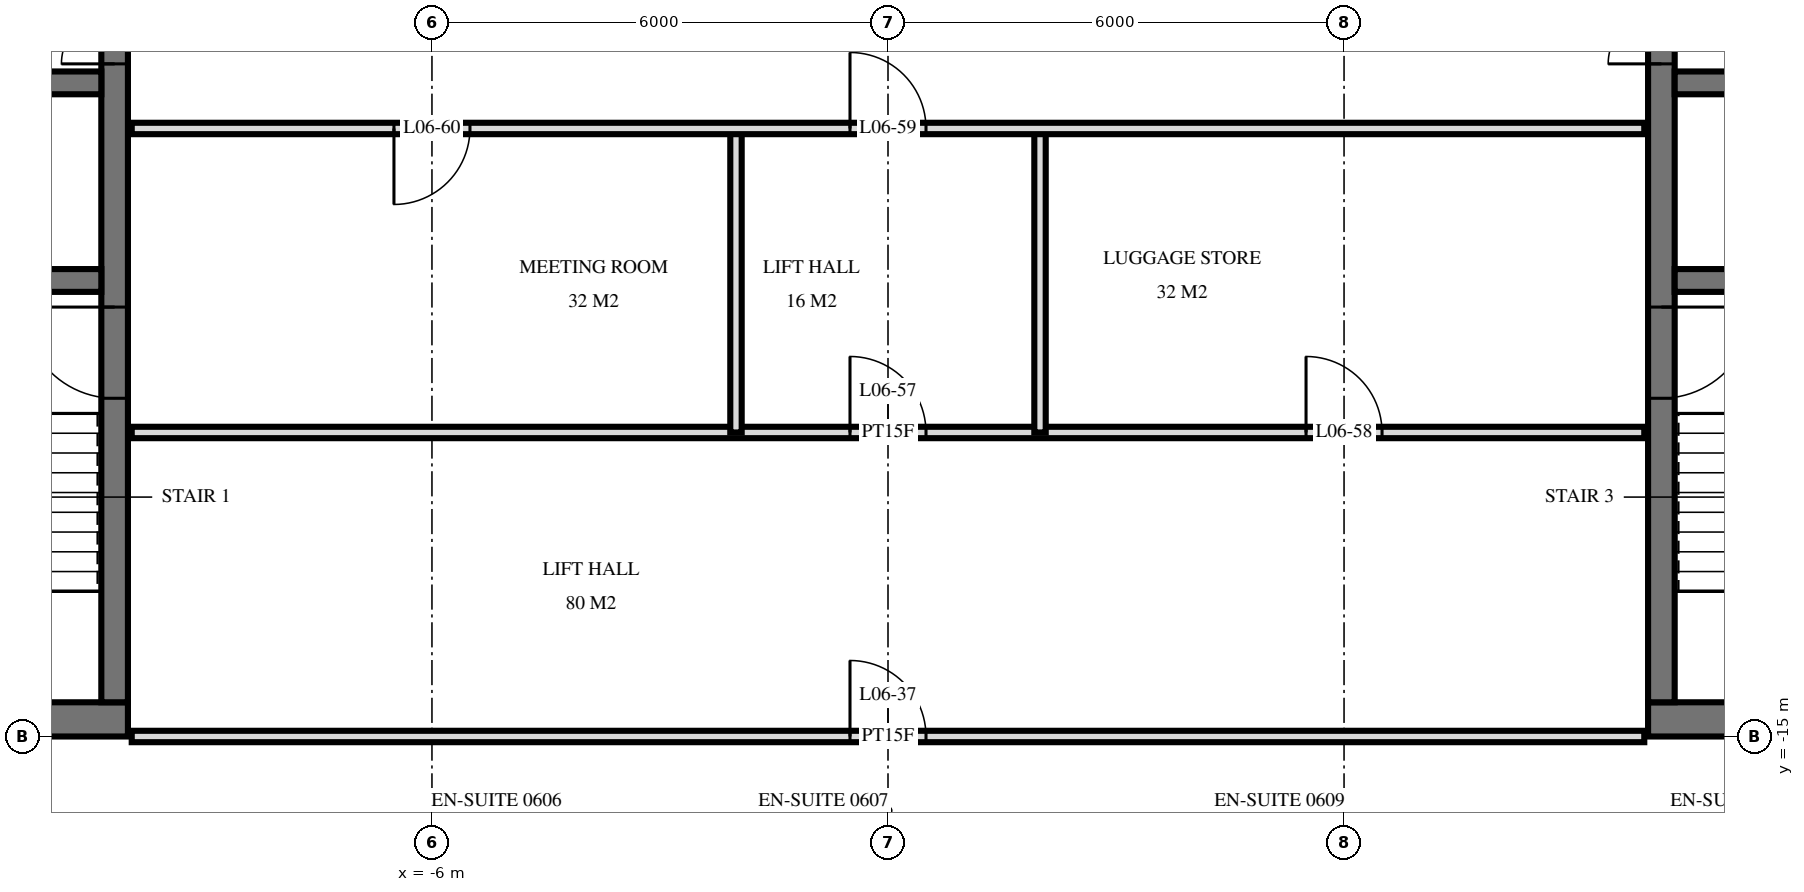
"""IFC4 building model, lengths in metres.
Left out: names, types, materials, properties, quantities, classifications, styles, units other than length and angle.
Written with IfcOpenShell. Run it as: python <this file> out.ifc"""

import sys

from ifc_helpers import new_model, si_unit, direction, frame, frame_2d, origin, place, context, subcontext, project, spatial, rectangle, extrude, element, fill, save


model = new_model("IFC4")
c1 = context("Model", 3, precision=1e-05, world=origin(), true_north=direction((0.0, 1.0)))
c2 = subcontext(c1, "Body", "Model", "MODEL_VIEW")
j1 = project(units=[si_unit("LENGTHUNIT", "METRE"), si_unit("PLANEANGLEUNIT", "RADIAN")], contexts=[c1])
p1 = place(None, origin())
s1 = spatial("IfcSite", under=j1, at=p1, CompositionType="ELEMENT")
p2 = place(p1, origin())
s2 = spatial("IfcBuilding", under=s1, at=p2, CompositionType="ELEMENT")
p3 = place(p2, frame((0.0, 0.0, 31.2)))
s3 = spatial("IfcBuildingStorey", under=s2, at=p3, CompositionType="ELEMENT", Elevation=31.2)
p4 = place(p3, frame((-29.5, -14.775, 0.0), z_axis=(0.0, 0.0, 1.0), x_axis=(1.0, 0.0, 0.0)))
e1 = element("IfcWall", 1, at=p4, inside=s3, PredefinedType="SHEAR", context=c2, shape_type="SweptSolid", body=[
    extrude(rectangle(XDim=19.5, YDim=0.45, at=frame_2d((9.75, 0.0))), origin(), (0.0, 0.0, 1.0), 3.6),
])
p5 = place(p4, frame((11.2, 0.0, 0.0)))
e2 = element("IfcOpeningElement", 2, at=p5, cuts=e1, PredefinedType="OPENING", context=c2, shape_type="SweptSolid", body=[
    extrude(rectangle(XDim=1.2, YDim=2.1, at=frame_2d((0.6, 1.05))), frame((0.0, 0.235, 0.0), z_axis=(0.0, -1.0, 0.0), x_axis=(1.0, 0.0, 0.0)), (0.0, 0.0, 1.0), 0.47),
])
p6 = place(p4, frame((14.25, 0.0, 0.0)))
e3 = element("IfcOpeningElement", 3, at=p6, cuts=e1, PredefinedType="OPENING", context=c2, shape_type="SweptSolid", body=[
    extrude(rectangle(XDim=1.1, YDim=2.1, at=frame_2d((0.55, 1.05))), frame((0.0, 0.235, 0.0), z_axis=(0.0, -1.0, 0.0), x_axis=(1.0, 0.0, 0.0)), (0.0, 0.0, 1.0), 0.47),
])
p7 = place(p4, frame((8.5, 0.0, 0.0)))
e4 = element("IfcOpeningElement", 4, at=p7, cuts=e1, PredefinedType="OPENING", context=c2, shape_type="SweptSolid", body=[
    extrude(rectangle(XDim=0.9, YDim=2.1, at=frame_2d((0.45, 1.05))), frame((0.0, 0.235, 0.0), z_axis=(0.0, -1.0, 0.0), x_axis=(1.0, 0.0, 0.0)), (0.0, 0.0, 1.0), 0.47),
])
p8 = place(p4, frame((6.05, 0.0, 0.0)))
e5 = element("IfcOpeningElement", 5, at=p8, cuts=e1, PredefinedType="OPENING", context=c2, shape_type="SweptSolid", body=[
    extrude(rectangle(XDim=1.0, YDim=2.1, at=frame_2d((0.5, 1.05))), frame((0.0, 0.235, 0.0), z_axis=(0.0, -1.0, 0.0), x_axis=(1.0, 0.0, 0.0)), (0.0, 0.0, 1.0), 0.47),
])
p9 = place(p4, frame((2.988, 0.0, 0.0)))
e6 = element("IfcOpeningElement", 6, at=p9, cuts=e1, PredefinedType="OPENING", context=c2, shape_type="SweptSolid", body=[
    extrude(rectangle(XDim=1.0, YDim=2.1, at=frame_2d((0.5, 1.05))), frame((0.0, 0.235, 0.0), z_axis=(0.0, -1.0, 0.0), x_axis=(1.0, 0.0, 0.0)), (0.0, 0.0, 1.0), 0.47),
])
p10 = place(p4, frame((0.663, 0.0, 0.0)))
e7 = element("IfcOpeningElement", 7, at=p10, cuts=e1, PredefinedType="OPENING", context=c2, shape_type="SweptSolid", body=[
    extrude(rectangle(XDim=1.0, YDim=2.1, at=frame_2d((0.5, 1.05))), frame((0.0, 0.235, 0.0), z_axis=(0.0, -1.0, 0.0), x_axis=(1.0, 0.0, 0.0)), (0.0, 0.0, 1.0), 0.47),
])
p11 = place(p3, frame((-10.175, -14.55, 0.0), z_axis=(0.0, 0.0, 1.0), x_axis=(0.0, 1.0, 0.0)))
e8 = element("IfcWall", 8, at=p11, inside=s3, PredefinedType="SHEAR", context=c2, shape_type="SweptSolid", body=[
    extrude(rectangle(XDim=14.1, YDim=0.35, at=frame_2d((7.05, 0.0))), origin(), (0.0, 0.0, 1.0), 3.6),
])
p12 = place(p11, frame((8.4, 0.0, 0.0)))
e9 = element("IfcOpeningElement", 9, at=p12, cuts=e8, PredefinedType="OPENING", context=c2, shape_type="SweptSolid", body=[
    extrude(rectangle(XDim=1.4, YDim=2.4, at=frame_2d((0.7, 1.2))), frame((0.0, 0.185, 0.0), z_axis=(0.0, -1.0, 0.0), x_axis=(1.0, 0.0, 0.0)), (0.0, 0.0, 1.0), 0.37),
])
p13 = place(p11, frame((10.0, 0.0, 0.0)))
e10 = element("IfcOpeningElement", 10, at=p13, cuts=e8, PredefinedType="OPENING", context=c2, shape_type="SweptSolid", body=[
    extrude(rectangle(XDim=1.4, YDim=2.4, at=frame_2d((0.7, 1.2))), frame((0.0, 0.185, 0.0), z_axis=(0.0, -1.0, 0.0), x_axis=(1.0, 0.0, 0.0)), (0.0, 0.0, 1.0), 0.37),
])
p14 = place(p11, frame((4.0, 0.0, 0.0)))
e11 = element("IfcOpeningElement", 11, at=p14, cuts=e8, PredefinedType="OPENING", context=c2, shape_type="SweptSolid", body=[
    extrude(rectangle(XDim=1.2, YDim=2.1, at=frame_2d((0.6, 1.05))), frame((0.0, 0.185, 0.0), z_axis=(0.0, -1.0, 0.0), x_axis=(1.0, 0.0, 0.0)), (0.0, 0.0, 1.0), 0.37),
])
p15 = place(p3, frame((-29.05, -6.4, 0.0), z_axis=(0.0, 0.0, 1.0), x_axis=(1.0, 0.0, 0.0)))
e12 = element("IfcWall", 12, at=p15, inside=s3, PredefinedType="SHEAR", context=c2, shape_type="SweptSolid", body=[
    extrude(rectangle(XDim=18.7, YDim=0.3, at=frame_2d((9.35, 0.0))), origin(), (0.0, 0.0, 1.0), 3.6),
])
p16 = place(p15, frame((2.95, 0.0, 0.0)))
e13 = element("IfcOpeningElement", 13, at=p16, cuts=e12, PredefinedType="OPENING", context=c2, shape_type="SweptSolid", body=[
    extrude(rectangle(XDim=1.1, YDim=2.1, at=frame_2d((0.55, 1.05))), frame((0.0, 0.16, 0.0), z_axis=(0.0, -1.0, 0.0), x_axis=(1.0, 0.0, 0.0)), (0.0, 0.0, 1.0), 0.32),
])
p17 = place(p15, frame((0.55, 0.0, 0.0)))
e14 = element("IfcOpeningElement", 14, at=p17, cuts=e12, PredefinedType="OPENING", context=c2, shape_type="SweptSolid", body=[
    extrude(rectangle(XDim=1.1, YDim=2.1, at=frame_2d((0.55, 1.05))), frame((0.0, 0.16, 0.0), z_axis=(0.0, -1.0, 0.0), x_axis=(1.0, 0.0, 0.0)), (0.0, 0.0, 1.0), 0.32),
])
p18 = place(p15, frame((10.8, 0.0, 0.0)))
e15 = element("IfcOpeningElement", 15, at=p18, cuts=e12, PredefinedType="OPENING", context=c2, shape_type="SweptSolid", body=[
    extrude(rectangle(XDim=1.1, YDim=2.1, at=frame_2d((0.55, 1.05))), frame((0.0, 0.16, 0.0), z_axis=(0.0, -1.0, 0.0), x_axis=(1.0, 0.0, 0.0)), (0.0, 0.0, 1.0), 0.32),
])
p19 = place(p15, frame((5.6, 0.0, 0.0)))
e16 = element("IfcOpeningElement", 16, at=p19, cuts=e12, PredefinedType="OPENING", context=c2, shape_type="SweptSolid", body=[
    extrude(rectangle(XDim=1.0, YDim=2.1, at=frame_2d((0.5, 1.05))), frame((0.0, 0.16, 0.0), z_axis=(0.0, -1.0, 0.0), x_axis=(1.0, 0.0, 0.0)), (0.0, 0.0, 1.0), 0.32),
])
p20 = place(p3, frame((-29.05, -9.0, 0.0), z_axis=(0.0, 0.0, 1.0), x_axis=(1.0, 0.0, 0.0)))
e17 = element("IfcWall", 17, at=p20, inside=s3, PredefinedType="SHEAR", context=c2, shape_type="SweptSolid", body=[
    extrude(rectangle(XDim=18.7, YDim=0.3, at=frame_2d((9.35, 0.0))), origin(), (0.0, 0.0, 1.0), 3.6),
])
p21 = place(p20, frame((13.8, 0.0, 0.0)))
e18 = element("IfcOpeningElement", 18, at=p21, cuts=e17, PredefinedType="OPENING", context=c2, shape_type="SweptSolid", body=[
    extrude(rectangle(XDim=1.1, YDim=2.1, at=frame_2d((0.55, 1.05))), frame((0.0, 0.16, 0.0), z_axis=(0.0, -1.0, 0.0), x_axis=(1.0, 0.0, 0.0)), (0.0, 0.0, 1.0), 0.32),
])
p22 = place(p3, frame((10.0, -14.775, 0.0), z_axis=(0.0, 0.0, 1.0), x_axis=(1.0, 0.0, 0.0)))
e19 = element("IfcWall", 19, at=p22, inside=s3, PredefinedType="SHEAR", context=c2, shape_type="SweptSolid", body=[
    extrude(rectangle(XDim=19.5, YDim=0.45, at=frame_2d((9.75, 0.0))), origin(), (0.0, 0.0, 1.0), 3.6),
])
p23 = place(p22, frame((7.1, 0.0, 0.0)))
e20 = element("IfcOpeningElement", 20, at=p23, cuts=e19, PredefinedType="OPENING", context=c2, shape_type="SweptSolid", body=[
    extrude(rectangle(XDim=1.2, YDim=2.1, at=frame_2d((0.6, 1.05))), frame((0.0, 0.235, 0.0), z_axis=(0.0, -1.0, 0.0), x_axis=(1.0, 0.0, 0.0)), (0.0, 0.0, 1.0), 0.47),
])
p24 = place(p22, frame((4.15, 0.0, 0.0)))
e21 = element("IfcOpeningElement", 21, at=p24, cuts=e19, PredefinedType="OPENING", context=c2, shape_type="SweptSolid", body=[
    extrude(rectangle(XDim=1.1, YDim=2.1, at=frame_2d((0.55, 1.05))), frame((0.0, 0.235, 0.0), z_axis=(0.0, -1.0, 0.0), x_axis=(1.0, 0.0, 0.0)), (0.0, 0.0, 1.0), 0.47),
])
p25 = place(p22, frame((10.1, 0.0, 0.0)))
e22 = element("IfcOpeningElement", 22, at=p25, cuts=e19, PredefinedType="OPENING", context=c2, shape_type="SweptSolid", body=[
    extrude(rectangle(XDim=0.9, YDim=2.1, at=frame_2d((0.45, 1.05))), frame((0.0, 0.235, 0.0), z_axis=(0.0, -1.0, 0.0), x_axis=(1.0, 0.0, 0.0)), (0.0, 0.0, 1.0), 0.47),
])
p26 = place(p22, frame((12.45, 0.0, 0.0)))
e23 = element("IfcOpeningElement", 23, at=p26, cuts=e19, PredefinedType="OPENING", context=c2, shape_type="SweptSolid", body=[
    extrude(rectangle(XDim=1.0, YDim=2.1, at=frame_2d((0.5, 1.05))), frame((0.0, 0.235, 0.0), z_axis=(0.0, -1.0, 0.0), x_axis=(1.0, 0.0, 0.0)), (0.0, 0.0, 1.0), 0.47),
])
p27 = place(p22, frame((15.512, 0.0, 0.0)))
e24 = element("IfcOpeningElement", 24, at=p27, cuts=e19, PredefinedType="OPENING", context=c2, shape_type="SweptSolid", body=[
    extrude(rectangle(XDim=1.0, YDim=2.1, at=frame_2d((0.5, 1.05))), frame((0.0, 0.235, 0.0), z_axis=(0.0, -1.0, 0.0), x_axis=(1.0, 0.0, 0.0)), (0.0, 0.0, 1.0), 0.47),
])
p28 = place(p22, frame((17.837, 0.0, 0.0)))
e25 = element("IfcOpeningElement", 25, at=p28, cuts=e19, PredefinedType="OPENING", context=c2, shape_type="SweptSolid", body=[
    extrude(rectangle(XDim=1.0, YDim=2.1, at=frame_2d((0.5, 1.05))), frame((0.0, 0.235, 0.0), z_axis=(0.0, -1.0, 0.0), x_axis=(1.0, 0.0, 0.0)), (0.0, 0.0, 1.0), 0.47),
])
p29 = place(p3, frame((10.175, -14.55, 0.0), z_axis=(0.0, 0.0, 1.0), x_axis=(0.0, 1.0, 0.0)))
e26 = element("IfcWall", 26, at=p29, inside=s3, PredefinedType="SHEAR", context=c2, shape_type="SweptSolid", body=[
    extrude(rectangle(XDim=14.1, YDim=0.35, at=frame_2d((7.05, 0.0))), origin(), (0.0, 0.0, 1.0), 3.6),
])
p30 = place(p29, frame((8.4, 0.0, 0.0)))
e27 = element("IfcOpeningElement", 27, at=p30, cuts=e26, PredefinedType="OPENING", context=c2, shape_type="SweptSolid", body=[
    extrude(rectangle(XDim=1.4, YDim=2.4, at=frame_2d((0.7, 1.2))), frame((0.0, 0.185, 0.0), z_axis=(0.0, -1.0, 0.0), x_axis=(1.0, 0.0, 0.0)), (0.0, 0.0, 1.0), 0.37),
])
p31 = place(p29, frame((10.0, 0.0, 0.0)))
e28 = element("IfcOpeningElement", 28, at=p31, cuts=e26, PredefinedType="OPENING", context=c2, shape_type="SweptSolid", body=[
    extrude(rectangle(XDim=1.4, YDim=2.4, at=frame_2d((0.7, 1.2))), frame((0.0, 0.185, 0.0), z_axis=(0.0, -1.0, 0.0), x_axis=(1.0, 0.0, 0.0)), (0.0, 0.0, 1.0), 0.37),
])
p32 = place(p29, frame((4.0, 0.0, 0.0)))
e29 = element("IfcOpeningElement", 29, at=p32, cuts=e26, PredefinedType="OPENING", context=c2, shape_type="SweptSolid", body=[
    extrude(rectangle(XDim=1.2, YDim=2.1, at=frame_2d((0.6, 1.05))), frame((0.0, 0.185, 0.0), z_axis=(0.0, -1.0, 0.0), x_axis=(1.0, 0.0, 0.0)), (0.0, 0.0, 1.0), 0.37),
])
p33 = place(p3, frame((10.35, -6.4, 0.0), z_axis=(0.0, 0.0, 1.0), x_axis=(1.0, 0.0, 0.0)))
e30 = element("IfcWall", 30, at=p33, inside=s3, PredefinedType="SHEAR", context=c2, shape_type="SweptSolid", body=[
    extrude(rectangle(XDim=18.7, YDim=0.3, at=frame_2d((9.35, 0.0))), origin(), (0.0, 0.0, 1.0), 3.6),
])
p34 = place(p33, frame((14.65, 0.0, 0.0)))
e31 = element("IfcOpeningElement", 31, at=p34, cuts=e30, PredefinedType="OPENING", context=c2, shape_type="SweptSolid", body=[
    extrude(rectangle(XDim=1.1, YDim=2.1, at=frame_2d((0.55, 1.05))), frame((0.0, 0.16, 0.0), z_axis=(0.0, -1.0, 0.0), x_axis=(1.0, 0.0, 0.0)), (0.0, 0.0, 1.0), 0.32),
])
p35 = place(p33, frame((17.05, 0.0, 0.0)))
e32 = element("IfcOpeningElement", 32, at=p35, cuts=e30, PredefinedType="OPENING", context=c2, shape_type="SweptSolid", body=[
    extrude(rectangle(XDim=1.1, YDim=2.1, at=frame_2d((0.55, 1.05))), frame((0.0, 0.16, 0.0), z_axis=(0.0, -1.0, 0.0), x_axis=(1.0, 0.0, 0.0)), (0.0, 0.0, 1.0), 0.32),
])
p36 = place(p33, frame((6.8, 0.0, 0.0)))
e33 = element("IfcOpeningElement", 33, at=p36, cuts=e30, PredefinedType="OPENING", context=c2, shape_type="SweptSolid", body=[
    extrude(rectangle(XDim=1.1, YDim=2.1, at=frame_2d((0.55, 1.05))), frame((0.0, 0.16, 0.0), z_axis=(0.0, -1.0, 0.0), x_axis=(1.0, 0.0, 0.0)), (0.0, 0.0, 1.0), 0.32),
])
p37 = place(p33, frame((12.1, 0.0, 0.0)))
e34 = element("IfcOpeningElement", 34, at=p37, cuts=e30, PredefinedType="OPENING", context=c2, shape_type="SweptSolid", body=[
    extrude(rectangle(XDim=1.0, YDim=2.1, at=frame_2d((0.5, 1.05))), frame((0.0, 0.16, 0.0), z_axis=(0.0, -1.0, 0.0), x_axis=(1.0, 0.0, 0.0)), (0.0, 0.0, 1.0), 0.32),
])
p38 = place(p3, frame((10.35, -9.0, 0.0), z_axis=(0.0, 0.0, 1.0), x_axis=(1.0, 0.0, 0.0)))
e35 = element("IfcWall", 35, at=p38, inside=s3, PredefinedType="SHEAR", context=c2, shape_type="SweptSolid", body=[
    extrude(rectangle(XDim=18.7, YDim=0.3, at=frame_2d((9.35, 0.0))), origin(), (0.0, 0.0, 1.0), 3.6),
])
p39 = place(p38, frame((3.8, 0.0, 0.0)))
e36 = element("IfcOpeningElement", 36, at=p39, cuts=e35, PredefinedType="OPENING", context=c2, shape_type="SweptSolid", body=[
    extrude(rectangle(XDim=1.1, YDim=2.1, at=frame_2d((0.55, 1.05))), frame((0.0, 0.16, 0.0), z_axis=(0.0, -1.0, 0.0), x_axis=(1.0, 0.0, 0.0)), (0.0, 0.0, 1.0), 0.32),
])
for number, where, z_axis, x_axis in (
    (37, (2.0, -11.0, 0.0), (0.0, 0.0, 1.0), (0.0, 1.0, 0.0)),
    (38, (-2.0, -11.0, 0.0), (0.0, 0.0, 1.0), (0.0, 1.0, 0.0)),
):
    element("IfcWall", number, at=place(p3, frame(where, z_axis=z_axis, x_axis=x_axis)), inside=s3, PredefinedType="PARTITIONING", context=c2, shape_type="SweptSolid", body=[
        extrude(rectangle(XDim=4.0, YDim=0.15, at=frame_2d((2.0, 0.0))), origin(), (0.0, 0.0, 1.0), 3.32),
    ])
p40 = place(p3, frame((-9.95, -15.0, 0.0), z_axis=(0.0, 0.0, 1.0), x_axis=(1.0, 0.0, 0.0)))
e39 = element("IfcWall", 39, at=p40, inside=s3, PredefinedType="PARTITIONING", context=c2, shape_type="SweptSolid", body=[
    extrude(rectangle(XDim=19.9, YDim=0.15, at=frame_2d((9.95, 0.0))), origin(), (0.0, 0.0, 1.0), 2.684),
])
p41 = place(p40, frame((9.45, 0.0, 0.0)))
e40 = element("IfcOpeningElement", 40, at=p41, cuts=e39, PredefinedType="OPENING", context=c2, shape_type="SweptSolid", body=[
    extrude(rectangle(XDim=1.0, YDim=2.1, at=frame_2d((0.5, 1.05))), frame((0.0, 0.085, 0.0), z_axis=(0.0, -1.0, 0.0), x_axis=(1.0, 0.0, 0.0)), (0.0, 0.0, 1.0), 0.17),
])
p42 = place(p3, frame((-9.95, -11.0, 0.0), z_axis=(0.0, 0.0, 1.0), x_axis=(1.0, 0.0, 0.0)))
e41 = element("IfcWall", 41, at=p42, inside=s3, PredefinedType="PARTITIONING", context=c2, shape_type="SweptSolid", body=[
    extrude(rectangle(XDim=19.9, YDim=0.15, at=frame_2d((9.95, 0.0))), origin(), (0.0, 0.0, 1.0), 3.32),
])
p43 = place(p42, frame((9.45, 0.0, 0.0)))
e42 = element("IfcOpeningElement", 42, at=p43, cuts=e41, PredefinedType="OPENING", context=c2, shape_type="SweptSolid", body=[
    extrude(rectangle(XDim=1.0, YDim=2.1, at=frame_2d((0.5, 1.05))), frame((0.0, 0.085, 0.0), z_axis=(0.0, -1.0, 0.0), x_axis=(1.0, 0.0, 0.0)), (0.0, 0.0, 1.0), 0.17),
])
p44 = place(p42, frame((15.45, 0.0, 0.0)))
e43 = element("IfcOpeningElement", 43, at=p44, cuts=e41, PredefinedType="OPENING", context=c2, shape_type="SweptSolid", body=[
    extrude(rectangle(XDim=1.0, YDim=2.1, at=frame_2d((0.5, 1.05))), frame((0.0, 0.085, 0.0), z_axis=(0.0, -1.0, 0.0), x_axis=(1.0, 0.0, 0.0)), (0.0, 0.0, 1.0), 0.17),
])
p45 = place(p3, frame((-9.95, -7.0, 0.0), z_axis=(0.0, 0.0, 1.0), x_axis=(1.0, 0.0, 0.0)))
e44 = element("IfcWall", 44, at=p45, inside=s3, PredefinedType="PARTITIONING", context=c2, shape_type="SweptSolid", body=[
    extrude(rectangle(XDim=19.9, YDim=0.15, at=frame_2d((9.95, 0.0))), origin(), (0.0, 0.0, 1.0), 3.32),
])
p46 = place(p45, frame((9.45, 0.0, 0.0)))
e45 = element("IfcOpeningElement", 45, at=p46, cuts=e44, PredefinedType="OPENING", context=c2, shape_type="SweptSolid", body=[
    extrude(rectangle(XDim=1.0, YDim=2.1, at=frame_2d((0.5, 1.05))), frame((0.0, 0.085, 0.0), z_axis=(0.0, -1.0, 0.0), x_axis=(1.0, 0.0, 0.0)), (0.0, 0.0, 1.0), 0.17),
])
p47 = place(p45, frame((3.45, 0.0, 0.0)))
e46 = element("IfcOpeningElement", 46, at=p47, cuts=e44, PredefinedType="OPENING", context=c2, shape_type="SweptSolid", body=[
    extrude(rectangle(XDim=1.0, YDim=2.1, at=frame_2d((0.5, 1.05))), frame((0.0, 0.085, 0.0), z_axis=(0.0, -1.0, 0.0), x_axis=(1.0, 0.0, 0.0)), (0.0, 0.0, 1.0), 0.17),
])
p48 = place(p12, origin())
e47 = element("IfcDoor", 47, at=p48, inside=s3, OperationType="DOUBLE_DOOR_SINGLE_SWING", PredefinedType="DOOR", context=c2, shape_type="SweptSolid", body=[
    extrude(rectangle(XDim=1.4, YDim=2.4, at=frame_2d((0.7, 1.2))), frame((0.0, 0.025, 0.0), z_axis=(0.0, -1.0, 0.0), x_axis=(1.0, 0.0, 0.0)), (0.0, 0.0, 1.0), 0.05),
])
fill(e9, e47)
p49 = place(p14, origin())
e48 = element("IfcDoor", 48, at=p49, inside=s3, OperationType="SINGLE_SWING_LEFT", PredefinedType="DOOR", context=c2, shape_type="SweptSolid", body=[
    extrude(rectangle(XDim=1.2, YDim=2.1, at=frame_2d((0.6, 1.05))), frame((0.0, 0.025, 0.0), z_axis=(0.0, -1.0, 0.0), x_axis=(1.0, 0.0, 0.0)), (0.0, 0.0, 1.0), 0.05),
])
fill(e11, e48)
p50 = place(p30, origin())
e49 = element("IfcDoor", 49, at=p50, inside=s3, OperationType="DOUBLE_DOOR_SINGLE_SWING", PredefinedType="DOOR", context=c2, shape_type="SweptSolid", body=[
    extrude(rectangle(XDim=1.4, YDim=2.4, at=frame_2d((0.7, 1.2))), frame((0.0, 0.025, 0.0), z_axis=(0.0, -1.0, 0.0), x_axis=(1.0, 0.0, 0.0)), (0.0, 0.0, 1.0), 0.05),
])
fill(e27, e49)
p51 = place(p32, frame((0.6, 0.0, 0.0), z_axis=(0.0, 0.0, 1.0), x_axis=(-1.0, 0.0, 0.0)))
e50 = element("IfcDoor", 50, at=p51, inside=s3, OperationType="SINGLE_SWING_RIGHT", PredefinedType="DOOR", context=c2, shape_type="SweptSolid", body=[
    extrude(rectangle(XDim=1.2, YDim=2.1, at=frame_2d((0.0, 1.05))), frame((0.0, -0.025, 0.0), z_axis=(0.0, 1.0, 0.0), x_axis=(-1.0, 0.0, 0.0)), (0.0, 0.0, 1.0), 0.05),
])
fill(e29, e50)
p52 = place(p41, origin())
e51 = element("IfcDoor", 51, at=p52, inside=s3, OperationType="SINGLE_SWING_RIGHT", PredefinedType="DOOR", context=c2, shape_type="SweptSolid", body=[
    extrude(rectangle(XDim=1.0, YDim=2.1, at=frame_2d((0.5, 1.05))), frame((0.0, 0.025, 0.0), z_axis=(0.0, -1.0, 0.0), x_axis=(1.0, 0.0, 0.0)), (0.0, 0.0, 1.0), 0.05),
])
fill(e40, e51)
p53 = place(p43, origin())
e52 = element("IfcDoor", 52, at=p53, inside=s3, OperationType="SINGLE_SWING_RIGHT", PredefinedType="DOOR", context=c2, shape_type="SweptSolid", body=[
    extrude(rectangle(XDim=1.0, YDim=2.1, at=frame_2d((0.5, 1.05))), frame((0.0, 0.025, 0.0), z_axis=(0.0, -1.0, 0.0), x_axis=(1.0, 0.0, 0.0)), (0.0, 0.0, 1.0), 0.05),
])
fill(e42, e52)
p54 = place(p44, origin())
e53 = element("IfcDoor", 53, at=p54, inside=s3, OperationType="SINGLE_SWING_RIGHT", PredefinedType="DOOR", context=c2, shape_type="SweptSolid", body=[
    extrude(rectangle(XDim=1.0, YDim=2.1, at=frame_2d((0.5, 1.05))), frame((0.0, 0.025, 0.0), z_axis=(0.0, -1.0, 0.0), x_axis=(1.0, 0.0, 0.0)), (0.0, 0.0, 1.0), 0.05),
])
fill(e43, e53)
p55 = place(p46, origin())
e54 = element("IfcDoor", 54, at=p55, inside=s3, OperationType="SINGLE_SWING_RIGHT", PredefinedType="DOOR", context=c2, shape_type="SweptSolid", body=[
    extrude(rectangle(XDim=1.0, YDim=2.1, at=frame_2d((0.5, 1.05))), frame((0.0, 0.025, 0.0), z_axis=(0.0, -1.0, 0.0), x_axis=(1.0, 0.0, 0.0)), (0.0, 0.0, 1.0), 0.05),
])
fill(e45, e54)
p56 = place(p47, frame((0.5, 0.0, 0.0), z_axis=(0.0, 0.0, 1.0), x_axis=(-1.0, 0.0, 0.0)))
e55 = element("IfcDoor", 55, at=p56, inside=s3, OperationType="SINGLE_SWING_LEFT", PredefinedType="DOOR", context=c2, shape_type="SweptSolid", body=[
    extrude(rectangle(XDim=1.0, YDim=2.1, at=frame_2d((0.0, 1.05))), frame((0.0, -0.025, 0.0), z_axis=(0.0, 1.0, 0.0), x_axis=(-1.0, 0.0, 0.0)), (0.0, 0.0, 1.0), 0.05),
])
fill(e46, e55)
save(model, sys.argv[1])
